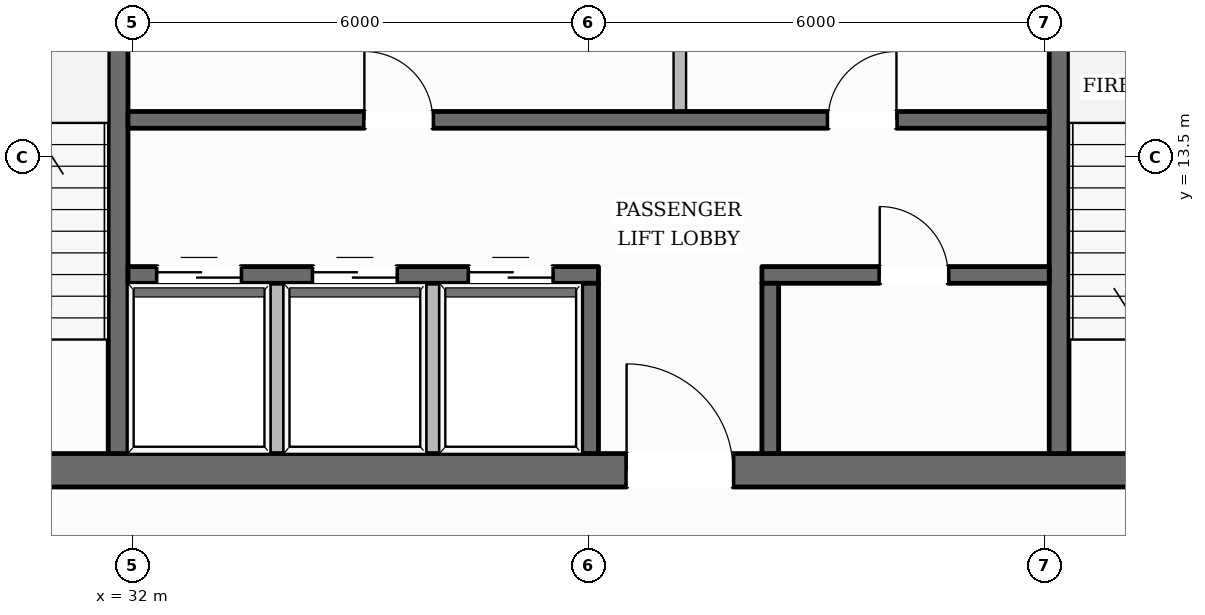
"""IFC4 building model, lengths in metres.
Left out: names, types, materials, properties, quantities, classifications, styles, units other than length and angle.
Written with IfcOpenShell. Run it as: python <this file> out.ifc"""

import sys

from ifc_helpers import new_model, si_unit, direction, frame, frame_2d, origin, place, context, subcontext, project, spatial, rectangle, extrude, element, fill, save


model = new_model("IFC4")
c1 = context("Model", 3, precision=1e-05, world=origin(), true_north=direction((0.0, 1.0)))
c2 = subcontext(c1, "Body", "Model", "MODEL_VIEW")
j1 = project(units=[si_unit("LENGTHUNIT", "METRE"), si_unit("PLANEANGLEUNIT", "RADIAN")], contexts=[c1])
p1 = place(None, origin())
s1 = spatial("IfcSite", under=j1, at=p1, CompositionType="ELEMENT")
p2 = place(p1, origin())
s2 = spatial("IfcBuilding", under=s1, at=p2, CompositionType="ELEMENT")
p3 = place(p2, frame((0.0, 0.0, 199.65)))
s3 = spatial("IfcBuildingStorey", under=s2, at=p3, CompositionType="ELEMENT", Elevation=199.65)
p4 = place(p3, frame((28.04, 9.38, 0.0), z_axis=(0.0, 0.0, 1.0), x_axis=(1.0, 0.0, 0.0)))
e1 = element("IfcWall", 1, at=p4, inside=s3, PredefinedType="SOLIDWALL", context=c2, shape_type="SweptSolid", body=[
    extrude(rectangle(XDim=19.92, YDim=0.44, at=frame_2d((9.96, 0.0))), origin(), (0.0, 0.0, 1.0), 3.6),
])
p5 = place(p4, frame((10.46, 0.0, 0.0)))
e2 = element("IfcOpeningElement", 2, at=p5, cuts=e1, PredefinedType="OPENING", context=c2, shape_type="SweptSolid", body=[
    extrude(rectangle(XDim=1.4, YDim=2.2, at=frame_2d((0.7, 1.1))), frame((0.0, 0.23, 0.0), z_axis=(0.0, -1.0, 0.0), x_axis=(1.0, 0.0, 0.0)), (0.0, 0.0, 1.0), 0.46),
])
p6 = place(p3, frame((31.81, 9.6, 0.0), z_axis=(0.0, 0.0, 1.0), x_axis=(0.0, 1.0, 0.0)))
e3 = element("IfcWall", 3, at=p6, inside=s3, PredefinedType="SHEAR", context=c2, shape_type="SweptSolid", body=[
    extrude(rectangle(XDim=13.0, YDim=0.26, at=frame_2d((6.5, 0.0))), origin(), (0.0, 0.0, 1.0), 3.6),
])
p7 = place(p6, frame((10.925, 0.0, 0.0)))
e4 = element("IfcOpeningElement", 4, at=p7, cuts=e3, PredefinedType="OPENING", context=c2, shape_type="SweptSolid", body=[
    extrude(rectangle(XDim=1.25, YDim=2.25, at=frame_2d((0.625, 1.125))), frame((0.0, 0.14, 0.0), z_axis=(0.0, -1.0, 0.0), x_axis=(1.0, 0.0, 0.0)), (0.0, 0.0, 1.0), 0.28),
])
p8 = place(p3, frame((44.19, 9.6, 0.0), z_axis=(0.0, 0.0, 1.0), x_axis=(0.0, 1.0, 0.0)))
e5 = element("IfcWall", 5, at=p8, inside=s3, PredefinedType="SHEAR", context=c2, shape_type="SweptSolid", body=[
    extrude(rectangle(XDim=13.0, YDim=0.26, at=frame_2d((6.5, 0.0))), origin(), (0.0, 0.0, 1.0), 3.6),
])
p9 = place(p8, frame((10.925, 0.0, 0.0)))
e6 = element("IfcOpeningElement", 6, at=p9, cuts=e5, PredefinedType="OPENING", context=c2, shape_type="SweptSolid", body=[
    extrude(rectangle(XDim=1.25, YDim=2.25, at=frame_2d((0.625, 1.125))), frame((0.0, 0.14, 0.0), z_axis=(0.0, -1.0, 0.0), x_axis=(1.0, 0.0, 0.0)), (0.0, 0.0, 1.0), 0.28),
])
p10 = place(p3, frame((31.94, 13.99, 0.0), z_axis=(0.0, 0.0, 1.0), x_axis=(1.0, 0.0, 0.0)))
e7 = element("IfcWall", 7, at=p10, inside=s3, PredefinedType="SOLIDWALL", context=c2, shape_type="SweptSolid", body=[
    extrude(rectangle(XDim=12.12, YDim=0.22, at=frame_2d((6.06, 0.0))), origin(), (0.0, 0.0, 1.0), 3.6),
])
p11 = place(p10, frame((3.11, 0.0, 0.0)))
e8 = element("IfcOpeningElement", 8, at=p11, cuts=e7, PredefinedType="OPENING", context=c2, shape_type="SweptSolid", body=[
    extrude(rectangle(XDim=0.9, YDim=2.1, at=frame_2d((0.45, 1.05))), frame((0.0, 0.12, 0.0), z_axis=(0.0, -1.0, 0.0), x_axis=(1.0, 0.0, 0.0)), (0.0, 0.0, 1.0), 0.24),
])
p12 = place(p10, frame((9.21, 0.0, 0.0)))
e9 = element("IfcOpeningElement", 9, at=p12, cuts=e7, PredefinedType="OPENING", context=c2, shape_type="SweptSolid", body=[
    extrude(rectangle(XDim=0.9, YDim=2.1, at=frame_2d((0.45, 1.05))), frame((0.0, 0.12, 0.0), z_axis=(0.0, -1.0, 0.0), x_axis=(1.0, 0.0, 0.0)), (0.0, 0.0, 1.0), 0.24),
])
p13 = place(p3, frame((31.94, 11.95, 0.0), z_axis=(0.0, 0.0, 1.0), x_axis=(1.0, 0.0, 0.0)))
e10 = element("IfcWall", 10, at=p13, inside=s3, PredefinedType="SOLIDWALL", context=c2, shape_type="SweptSolid", body=[
    extrude(rectangle(XDim=6.19, YDim=0.22, at=frame_2d((3.095, 0.0))), origin(), (0.0, 0.0, 1.0), 3.6),
])
p14 = place(p13, frame((0.385, 0.0, 0.0)))
e11 = element("IfcOpeningElement", 11, at=p14, cuts=e10, PredefinedType="OPENING", context=c2, shape_type="SweptSolid", body=[
    extrude(rectangle(XDim=1.1, YDim=2.2, at=frame_2d((0.55, 1.1))), frame((0.0, 0.12, 0.0), z_axis=(0.0, -1.0, 0.0), x_axis=(1.0, 0.0, 0.0)), (0.0, 0.0, 1.0), 0.24),
])
p15 = place(p13, frame((2.435, 0.0, 0.0)))
e12 = element("IfcOpeningElement", 12, at=p15, cuts=e10, PredefinedType="OPENING", context=c2, shape_type="SweptSolid", body=[
    extrude(rectangle(XDim=1.1, YDim=2.2, at=frame_2d((0.55, 1.1))), frame((0.0, 0.12, 0.0), z_axis=(0.0, -1.0, 0.0), x_axis=(1.0, 0.0, 0.0)), (0.0, 0.0, 1.0), 0.24),
])
p16 = place(p13, frame((4.485, 0.0, 0.0)))
e13 = element("IfcOpeningElement", 13, at=p16, cuts=e10, PredefinedType="OPENING", context=c2, shape_type="SweptSolid", body=[
    extrude(rectangle(XDim=1.1, YDim=2.2, at=frame_2d((0.55, 1.1))), frame((0.0, 0.12, 0.0), z_axis=(0.0, -1.0, 0.0), x_axis=(1.0, 0.0, 0.0)), (0.0, 0.0, 1.0), 0.24),
])
p17 = place(p3, frame((40.28, 11.95, 0.0), z_axis=(0.0, 0.0, 1.0), x_axis=(1.0, 0.0, 0.0)))
e14 = element("IfcWall", 14, at=p17, inside=s3, PredefinedType="SOLIDWALL", context=c2, shape_type="SweptSolid", body=[
    extrude(rectangle(XDim=3.78, YDim=0.22, at=frame_2d((1.89, 0.0))), origin(), (0.0, 0.0, 1.0), 3.6),
])
p18 = place(p17, frame((1.55, 0.0, 0.0)))
e15 = element("IfcOpeningElement", 15, at=p18, cuts=e14, PredefinedType="OPENING", context=c2, shape_type="SweptSolid", body=[
    extrude(rectangle(XDim=0.9, YDim=2.1, at=frame_2d((0.45, 1.05))), frame((0.0, 0.12, 0.0), z_axis=(0.0, -1.0, 0.0), x_axis=(1.0, 0.0, 0.0)), (0.0, 0.0, 1.0), 0.24),
])
for number, where, z_axis, x_axis in (
    (16, (38.02, 9.6, 0.0), (0.0, 0.0, 1.0), (0.0, 1.0, 0.0)),
    (17, (40.39, 9.6, 0.0), (0.0, 0.0, 1.0), (0.0, 1.0, 0.0)),
):
    element("IfcWall", number, at=place(p3, frame(where, z_axis=z_axis, x_axis=x_axis)), inside=s3, PredefinedType="SOLIDWALL", context=c2, shape_type="SweptSolid", body=[
        extrude(rectangle(XDim=2.24, YDim=0.22, at=frame_2d((1.12, 0.0))), origin(), (0.0, 0.0, 1.0), 3.6),
    ])
p19 = place(p3, frame((14.586, 11.347, 0.0), z_axis=(0.0, 0.0, 1.0), x_axis=(0.504997770855, 0.863120647089, 0.0)))
e18 = element("IfcWall", 18, at=p19, inside=s3, PredefinedType="STANDARD", context=c2, shape_type="SweptSolid", body=[
    extrude(rectangle(XDim=37.843, YDim=0.35, at=frame_2d((18.921, 0.0))), origin(), (0.0, 0.0, 1.0), 3.132),
])
p20 = place(p19, frame((9.061, 0.0, 0.0)))
e19 = element("IfcOpeningElement", 19, at=p20, cuts=e18, PredefinedType="OPENING", context=c2, shape_type="SweptSolid", body=[
    extrude(rectangle(XDim=1.0, YDim=2.2, at=frame_2d((0.5, 1.1))), frame((0.0, 0.185, 0.0), z_axis=(0.0, -1.0, 0.0), x_axis=(1.0, 0.0, 0.0)), (0.0, 0.0, 1.0), 0.37),
])
p21 = place(p19, frame((33.567, 0.0, 0.65)))
e20 = element("IfcOpeningElement", 20, at=p21, cuts=e18, PredefinedType="OPENING", context=c2, shape_type="SweptSolid", body=[
    extrude(rectangle(XDim=1.45, YDim=1.75, at=frame_2d((0.725, 0.875))), frame((0.0, 0.185, 0.0), z_axis=(0.0, -1.0, 0.0), x_axis=(1.0, 0.0, 0.0)), (0.0, 0.0, 1.0), 0.37),
])
p22 = place(p19, frame((27.42, 0.0, 0.65)))
e21 = element("IfcOpeningElement", 21, at=p22, cuts=e18, PredefinedType="OPENING", context=c2, shape_type="SweptSolid", body=[
    extrude(rectangle(XDim=1.45, YDim=1.75, at=frame_2d((0.725, 0.875))), frame((0.0, 0.185, 0.0), z_axis=(0.0, -1.0, 0.0), x_axis=(1.0, 0.0, 0.0)), (0.0, 0.0, 1.0), 0.37),
])
p23 = place(p19, frame((21.273, 0.0, 0.65)))
e22 = element("IfcOpeningElement", 22, at=p23, cuts=e18, PredefinedType="OPENING", context=c2, shape_type="SweptSolid", body=[
    extrude(rectangle(XDim=1.45, YDim=1.75, at=frame_2d((0.725, 0.875))), frame((0.0, 0.185, 0.0), z_axis=(0.0, -1.0, 0.0), x_axis=(1.0, 0.0, 0.0)), (0.0, 0.0, 1.0), 0.37),
])
p24 = place(p19, frame((2.831, 0.0, 0.65)))
e23 = element("IfcOpeningElement", 23, at=p24, cuts=e18, PredefinedType="OPENING", context=c2, shape_type="SweptSolid", body=[
    extrude(rectangle(XDim=1.45, YDim=1.75, at=frame_2d((0.725, 0.875))), frame((0.0, 0.185, 0.0), z_axis=(0.0, -1.0, 0.0), x_axis=(1.0, 0.0, 0.0)), (0.0, 0.0, 1.0), 0.37),
])
p25 = place(p3, frame((42.36, 43.976, 0.0), z_axis=(0.0, 0.0, 1.0), x_axis=(0.508076618563, -0.861311877121, 0.0)))
e24 = element("IfcWall", 24, at=p25, inside=s3, PredefinedType="STANDARD", context=c2, shape_type="SweptSolid", body=[
    extrude(rectangle(XDim=38.079, YDim=0.35, at=frame_2d((19.04, 0.0))), origin(), (0.0, 0.0, 1.0), 3.132),
])
p26 = place(p25, frame((9.12, 0.0, 0.0)))
e25 = element("IfcOpeningElement", 25, at=p26, cuts=e24, PredefinedType="OPENING", context=c2, shape_type="SweptSolid", body=[
    extrude(rectangle(XDim=1.0, YDim=2.2, at=frame_2d((0.5, 1.1))), frame((0.0, 0.185, 0.0), z_axis=(0.0, -1.0, 0.0), x_axis=(1.0, 0.0, 0.0)), (0.0, 0.0, 1.0), 0.37),
])
p27 = place(p25, frame((33.779, 0.0, 0.65)))
e26 = element("IfcOpeningElement", 26, at=p27, cuts=e24, PredefinedType="OPENING", context=c2, shape_type="SweptSolid", body=[
    extrude(rectangle(XDim=1.45, YDim=1.75, at=frame_2d((0.725, 0.875))), frame((0.0, 0.185, 0.0), z_axis=(0.0, -1.0, 0.0), x_axis=(1.0, 0.0, 0.0)), (0.0, 0.0, 1.0), 0.37),
])
p28 = place(p25, frame((27.591, 0.0, 0.65)))
e27 = element("IfcOpeningElement", 27, at=p28, cuts=e24, PredefinedType="OPENING", context=c2, shape_type="SweptSolid", body=[
    extrude(rectangle(XDim=1.45, YDim=1.75, at=frame_2d((0.725, 0.875))), frame((0.0, 0.185, 0.0), z_axis=(0.0, -1.0, 0.0), x_axis=(1.0, 0.0, 0.0)), (0.0, 0.0, 1.0), 0.37),
])
p29 = place(p25, frame((21.404, 0.0, 0.65)))
e28 = element("IfcOpeningElement", 28, at=p29, cuts=e24, PredefinedType="OPENING", context=c2, shape_type="SweptSolid", body=[
    extrude(rectangle(XDim=1.45, YDim=1.75, at=frame_2d((0.725, 0.875))), frame((0.0, 0.185, 0.0), z_axis=(0.0, -1.0, 0.0), x_axis=(1.0, 0.0, 0.0)), (0.0, 0.0, 1.0), 0.37),
])
p30 = place(p25, frame((2.842, 0.0, 0.65)))
e29 = element("IfcOpeningElement", 29, at=p30, cuts=e24, PredefinedType="OPENING", context=c2, shape_type="SweptSolid", body=[
    extrude(rectangle(XDim=1.45, YDim=1.75, at=frame_2d((0.725, 0.875))), frame((0.0, 0.185, 0.0), z_axis=(0.0, -1.0, 0.0), x_axis=(1.0, 0.0, 0.0)), (0.0, 0.0, 1.0), 0.37),
])
for number, where, z_axis, x_axis in (
    (30, (33.9, 9.52, 0.0), (0.0, 0.0, 1.0), (0.0, 1.0, 0.0)),
    (31, (35.95, 9.52, 0.0), (0.0, 0.0, 1.0), (0.0, 1.0, 0.0)),
):
    element("IfcWall", number, at=place(p3, frame(where, z_axis=z_axis, x_axis=x_axis)), inside=s3, PredefinedType="PARTITIONING", context=c2, shape_type="SweptSolid", body=[
        extrude(rectangle(XDim=2.32, YDim=0.165, at=frame_2d((1.16, 0.0))), origin(), (0.0, 0.0, 1.0), 3.6),
    ])
p31 = place(p3, frame((39.2, 14.1, 0.0), z_axis=(0.0, 0.0, 1.0), x_axis=(0.0, 1.0, 0.0)))
e32 = element("IfcWall", 32, at=p31, inside=s3, PredefinedType="PARTITIONING", context=c2, shape_type="SweptSolid", body=[
    extrude(rectangle(XDim=2.24, YDim=0.165, at=frame_2d((1.12, 0.0))), origin(), (0.0, 0.0, 1.0), 3.6),
])
p32 = place(p5, origin())
e33 = element("IfcDoor", 33, at=p32, inside=s3, OperationType="SINGLE_SWING_LEFT", PredefinedType="DOOR", context=c2, shape_type="SweptSolid", body=[
    extrude(rectangle(XDim=1.4, YDim=2.2, at=frame_2d((0.7, 1.1))), frame((0.0, 0.025, 0.0), z_axis=(0.0, -1.0, 0.0), x_axis=(1.0, 0.0, 0.0)), (0.0, 0.0, 1.0), 0.05),
])
fill(e2, e33)
p33 = place(p14, origin())
e34 = element("IfcDoor", 34, at=p33, inside=s3, OperationType="DOUBLE_DOOR_SLIDING", PredefinedType="DOOR", context=c2, shape_type="SweptSolid", body=[
    extrude(rectangle(XDim=1.1, YDim=2.2, at=frame_2d((0.55, 1.1))), frame((0.0, 0.025, 0.0), z_axis=(0.0, -1.0, 0.0), x_axis=(1.0, 0.0, 0.0)), (0.0, 0.0, 1.0), 0.05),
])
fill(e11, e34)
p34 = place(p15, origin())
e35 = element("IfcDoor", 35, at=p34, inside=s3, OperationType="DOUBLE_DOOR_SLIDING", PredefinedType="DOOR", context=c2, shape_type="SweptSolid", body=[
    extrude(rectangle(XDim=1.1, YDim=2.2, at=frame_2d((0.55, 1.1))), frame((0.0, 0.025, 0.0), z_axis=(0.0, -1.0, 0.0), x_axis=(1.0, 0.0, 0.0)), (0.0, 0.0, 1.0), 0.05),
])
fill(e12, e35)
p35 = place(p16, origin())
e36 = element("IfcDoor", 36, at=p35, inside=s3, OperationType="DOUBLE_DOOR_SLIDING", PredefinedType="DOOR", context=c2, shape_type="SweptSolid", body=[
    extrude(rectangle(XDim=1.1, YDim=2.2, at=frame_2d((0.55, 1.1))), frame((0.0, 0.025, 0.0), z_axis=(0.0, -1.0, 0.0), x_axis=(1.0, 0.0, 0.0)), (0.0, 0.0, 1.0), 0.05),
])
fill(e13, e36)
p36 = place(p11, origin())
e37 = element("IfcDoor", 37, at=p36, inside=s3, OperationType="SINGLE_SWING_LEFT", PredefinedType="DOOR", context=c2, shape_type="SweptSolid", body=[
    extrude(rectangle(XDim=0.9, YDim=2.1, at=frame_2d((0.45, 1.05))), frame((0.0, 0.025, 0.0), z_axis=(0.0, -1.0, 0.0), x_axis=(1.0, 0.0, 0.0)), (0.0, 0.0, 1.0), 0.05),
])
fill(e8, e37)
p37 = place(p12, origin())
e38 = element("IfcDoor", 38, at=p37, inside=s3, OperationType="SINGLE_SWING_RIGHT", PredefinedType="DOOR", context=c2, shape_type="SweptSolid", body=[
    extrude(rectangle(XDim=0.9, YDim=2.1, at=frame_2d((0.45, 1.05))), frame((0.0, 0.025, 0.0), z_axis=(0.0, -1.0, 0.0), x_axis=(1.0, 0.0, 0.0)), (0.0, 0.0, 1.0), 0.05),
])
fill(e9, e38)
p38 = place(p18, origin())
e39 = element("IfcDoor", 39, at=p38, inside=s3, OperationType="SINGLE_SWING_LEFT", PredefinedType="DOOR", context=c2, shape_type="SweptSolid", body=[
    extrude(rectangle(XDim=0.9, YDim=2.1, at=frame_2d((0.45, 1.05))), frame((0.0, 0.025, 0.0), z_axis=(0.0, -1.0, 0.0), x_axis=(1.0, 0.0, 0.0)), (0.0, 0.0, 1.0), 0.05),
])
fill(e15, e39)
save(model, sys.argv[1])
